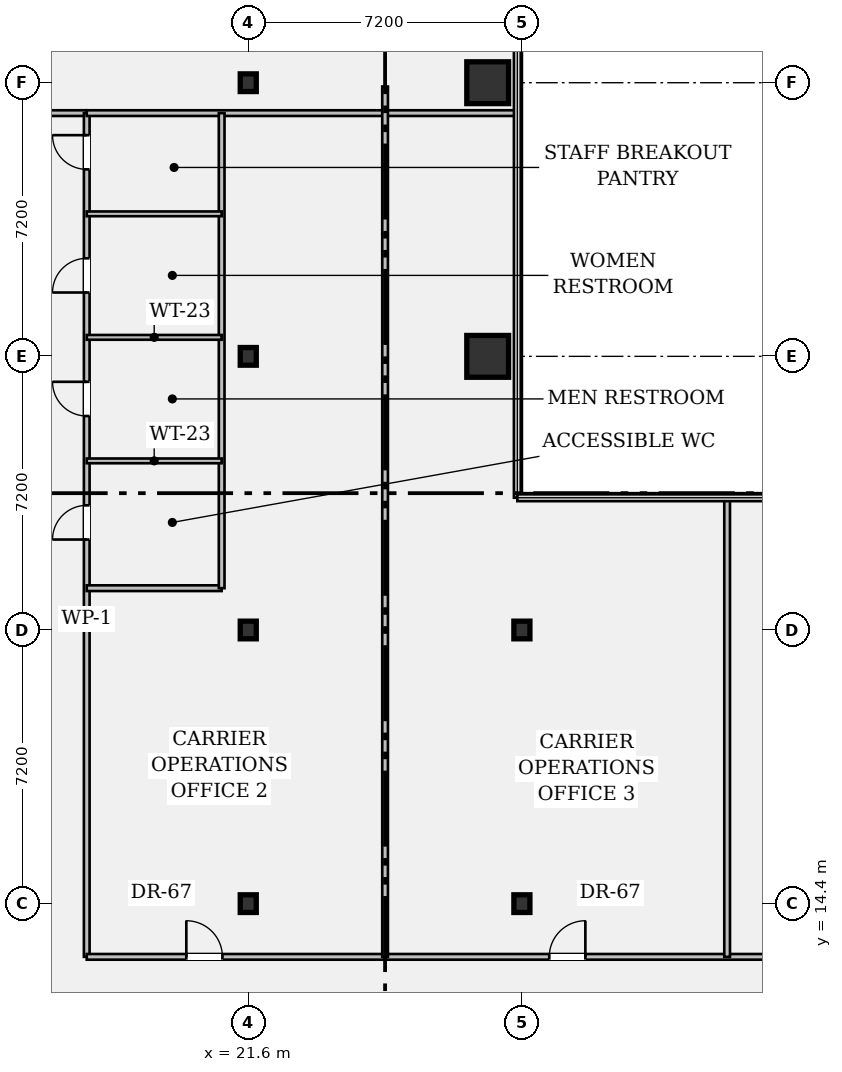
"""IFC4 building model, lengths in metres.
Left out: names, types, materials, properties, quantities, classifications, styles, units other than length and angle.
Written with IfcOpenShell. Run it as: python <this file> out.ifc"""

import sys

from ifc_helpers import new_model, si_unit, direction, frame, frame_2d, origin, origin_2d, place, context, subcontext, project, spatial, rectangle, hollow_rectangle, i_section, extrude, element, fill, save


model = new_model("IFC4")
c1 = context("Model", 3, precision=1e-05, world=origin(), true_north=direction((0.0, 1.0)))
c2 = subcontext(c1, "Body", "Model", "MODEL_VIEW")
j1 = project(units=[si_unit("LENGTHUNIT", "METRE"), si_unit("PLANEANGLEUNIT", "RADIAN")], contexts=[c1])
p1 = place(None, origin())
s1 = spatial("IfcSite", under=j1, at=p1, CompositionType="ELEMENT")
p2 = place(p1, origin())
s2 = spatial("IfcBuilding", under=s1, at=p2, CompositionType="ELEMENT")
p3 = place(p2, frame((0.0, 0.0, 31.15)))
s3 = spatial("IfcBuildingStorey", under=s2, at=p3, CompositionType="ELEMENT", Elevation=31.15)
for number, where, z_axis, x_axis in (
    (1, (21.6, 14.4, 0.0), (0.0, 0.0, 1.0), (1.0, 0.0, 0.0)),
    (2, (21.6, 21.6, 0.0), (0.0, 0.0, 1.0), (1.0, 0.0, 0.0)),
    (3, (21.6, 28.8, 0.0), (0.0, 0.0, 1.0), (1.0, 0.0, 0.0)),
    (4, (21.6, 36.0, 0.0), (0.0, 0.0, 1.0), (1.0, 0.0, 0.0)),
):
    element("IfcColumn", number, at=place(p3, frame(where, z_axis=z_axis, x_axis=x_axis)), inside=s3, PredefinedType="COLUMN", context=c2, shape_type="SweptSolid", body=[
        extrude(i_section(OverallWidth=0.422, OverallDepth=0.465, WebThickness=0.045, FlangeThickness=0.073, FilletRadius=0.018, at=origin_2d()), origin(), (0.0, 0.0, 1.0), 3.57),
    ])
for number, where, z_axis, x_axis in (
    (5, (27.9, 28.8, 0.0), (0.0, 0.0, 1.0), (1.0, 0.0, 0.0)),
    (6, (27.9, 36.0, 0.0), (0.0, 0.0, 1.0), (1.0, 0.0, 0.0)),
):
    element("IfcColumn", number, at=place(p3, frame(where, z_axis=z_axis, x_axis=x_axis)), inside=s3, PredefinedType="COLUMN", context=c2, shape_type="SweptSolid", body=[
        extrude(hollow_rectangle(XDim=1.1, YDim=1.1, WallThickness=0.07, at=origin_2d()), origin(), (0.0, 0.0, 1.0), 3.57),
    ])
for number, where, z_axis, x_axis in (
    (7, (28.8, 14.4, 0.0), (0.0, 0.0, 1.0), (1.0, 0.0, 0.0)),
    (8, (28.8, 21.6, 0.0), (0.0, 0.0, 1.0), (1.0, 0.0, 0.0)),
):
    element("IfcColumn", number, at=place(p3, frame(where, z_axis=z_axis, x_axis=x_axis)), inside=s3, PredefinedType="COLUMN", context=c2, shape_type="SweptSolid", body=[
        extrude(i_section(OverallWidth=0.422, OverallDepth=0.465, WebThickness=0.045, FlangeThickness=0.073, FilletRadius=0.018, at=origin_2d()), origin(), (0.0, 0.0, 1.0), 3.57),
    ])
p4 = place(p3, frame((14.4, 35.2, 0.0), z_axis=(0.0, 0.0, 1.0), x_axis=(1.0, 0.0, 0.0)))
e9 = element("IfcWall", 9, at=p4, inside=s3, PredefinedType="PARTITIONING", context=c2, shape_type="SweptSolid", body=[
    extrude(rectangle(XDim=2.95, YDim=0.15, at=frame_2d((1.475, 0.0))), origin(), (0.0, 0.0, 1.0), 2.628),
])
p5 = place(p4, frame((0.95, 0.0, 0.0)))
e10 = element("IfcOpeningElement", 10, at=p5, cuts=e9, PredefinedType="OPENING", context=c2, shape_type="SweptSolid", body=[
    extrude(rectangle(XDim=1.0, YDim=2.15, at=frame_2d((0.5, 1.075))), frame((0.0, 0.087, 0.0), z_axis=(0.0, -1.0, 0.0), x_axis=(1.0, 0.0, 0.0)), (0.0, 0.0, 1.0), 0.174),
])
p6 = place(p3, frame((17.35, 13.0, 0.0), z_axis=(0.0, 0.0, 1.0), x_axis=(0.0, 1.0, 0.0)))
e11 = element("IfcWall", 11, at=p6, inside=s3, PredefinedType="PARTITIONING", context=c2, shape_type="SweptSolid", body=[
    extrude(rectangle(XDim=22.2, YDim=0.15, at=frame_2d((11.1, 0.0))), origin(), (0.0, 0.0, 1.0), 2.628),
])
p7 = place(p6, frame((10.98, 0.0, 0.0)))
e12 = element("IfcOpeningElement", 12, at=p7, cuts=e11, PredefinedType="OPENING", context=c2, shape_type="SweptSolid", body=[
    extrude(rectangle(XDim=0.9, YDim=2.15, at=frame_2d((0.45, 1.075))), frame((0.0, 0.087, 0.0), z_axis=(0.0, -1.0, 0.0), x_axis=(1.0, 0.0, 0.0)), (0.0, 0.0, 1.0), 0.174),
])
p8 = place(p6, frame((14.23, 0.0, 0.0)))
e13 = element("IfcOpeningElement", 13, at=p8, cuts=e11, PredefinedType="OPENING", context=c2, shape_type="SweptSolid", body=[
    extrude(rectangle(XDim=0.9, YDim=2.15, at=frame_2d((0.45, 1.075))), frame((0.0, 0.087, 0.0), z_axis=(0.0, -1.0, 0.0), x_axis=(1.0, 0.0, 0.0)), (0.0, 0.0, 1.0), 0.174),
])
p9 = place(p6, frame((17.48, 0.0, 0.0)))
e14 = element("IfcOpeningElement", 14, at=p9, cuts=e11, PredefinedType="OPENING", context=c2, shape_type="SweptSolid", body=[
    extrude(rectangle(XDim=0.9, YDim=2.15, at=frame_2d((0.45, 1.075))), frame((0.0, 0.087, 0.0), z_axis=(0.0, -1.0, 0.0), x_axis=(1.0, 0.0, 0.0)), (0.0, 0.0, 1.0), 0.174),
])
p10 = place(p6, frame((20.72, 0.0, 0.0)))
e15 = element("IfcOpeningElement", 15, at=p10, cuts=e11, PredefinedType="OPENING", context=c2, shape_type="SweptSolid", body=[
    extrude(rectangle(XDim=0.9, YDim=2.15, at=frame_2d((0.45, 1.075))), frame((0.0, 0.087, 0.0), z_axis=(0.0, -1.0, 0.0), x_axis=(1.0, 0.0, 0.0)), (0.0, 0.0, 1.0), 0.174),
])
p11 = place(p3, frame((17.35, 13.0, 0.0), z_axis=(0.0, 0.0, 1.0), x_axis=(1.0, 0.0, 0.0)))
e16 = element("IfcWall", 16, at=p11, inside=s3, PredefinedType="PARTITIONING", context=c2, shape_type="SweptSolid", body=[
    extrude(rectangle(XDim=25.25, YDim=0.15, at=frame_2d((12.625, 0.0))), origin(), (0.0, 0.0, 1.0), 2.628),
])
p12 = place(p11, frame((2.62, 0.0, 0.0)))
e17 = element("IfcOpeningElement", 17, at=p12, cuts=e16, PredefinedType="OPENING", context=c2, shape_type="SweptSolid", body=[
    extrude(rectangle(XDim=0.95, YDim=2.15, at=frame_2d((0.475, 1.075))), frame((0.0, 0.087, 0.0), z_axis=(0.0, -1.0, 0.0), x_axis=(1.0, 0.0, 0.0)), (0.0, 0.0, 1.0), 0.174),
])
p13 = place(p11, frame((12.17, 0.0, 0.0)))
e18 = element("IfcOpeningElement", 18, at=p13, cuts=e16, PredefinedType="OPENING", context=c2, shape_type="SweptSolid", body=[
    extrude(rectangle(XDim=0.95, YDim=2.15, at=frame_2d((0.475, 1.075))), frame((0.0, 0.087, 0.0), z_axis=(0.0, -1.0, 0.0), x_axis=(1.0, 0.0, 0.0)), (0.0, 0.0, 1.0), 0.174),
])
p14 = place(p11, frame((20.55, 0.0, 0.0)))
e19 = element("IfcOpeningElement", 19, at=p14, cuts=e16, PredefinedType="OPENING", context=c2, shape_type="SweptSolid", body=[
    extrude(rectangle(XDim=0.95, YDim=2.15, at=frame_2d((0.475, 1.075))), frame((0.0, 0.087, 0.0), z_axis=(0.0, -1.0, 0.0), x_axis=(1.0, 0.0, 0.0)), (0.0, 0.0, 1.0), 0.174),
])
p15 = place(p3, frame((17.35, 35.2, 0.0), z_axis=(0.0, 0.0, 1.0), x_axis=(1.0, 0.0, 0.0)))
e20 = element("IfcWall", 20, at=p15, inside=s3, PredefinedType="PARTITIONING", context=c2, shape_type="SweptSolid", body=[
    extrude(rectangle(XDim=11.33, YDim=0.15, at=frame_2d((5.665, 0.0))), origin(), (0.0, 0.0, 1.0), 2.628),
])
p16 = place(p3, frame((17.35, 22.7, 0.0), z_axis=(0.0, 0.0, 1.0), x_axis=(1.0, 0.0, 0.0)))
e21 = element("IfcWall", 21, at=p16, inside=s3, PredefinedType="PARTITIONING", context=c2, shape_type="SweptSolid", body=[
    extrude(rectangle(XDim=3.55, YDim=0.15, at=frame_2d((1.775, 0.0))), origin(), (0.0, 0.0, 1.0), 3.088),
])
p17 = place(p3, frame((20.9, 22.7, 0.0), z_axis=(0.0, 0.0, 1.0), x_axis=(0.0, 1.0, 0.0)))
e22 = element("IfcWall", 22, at=p17, inside=s3, PredefinedType="PARTITIONING", context=c2, shape_type="SweptSolid", body=[
    extrude(rectangle(XDim=12.5, YDim=0.15, at=frame_2d((6.25, 0.0))), origin(), (0.0, 0.0, 1.0), 2.628),
])
for number, where, z_axis, x_axis in (
    (23, (17.35, 26.05, 0.0), (0.0, 0.0, 1.0), (1.0, 0.0, 0.0)),
    (24, (17.35, 29.3, 0.0), (0.0, 0.0, 1.0), (1.0, 0.0, 0.0)),
    (25, (17.35, 32.55, 0.0), (0.0, 0.0, 1.0), (1.0, 0.0, 0.0)),
):
    element("IfcWall", number, at=place(p3, frame(where, z_axis=z_axis, x_axis=x_axis)), inside=s3, PredefinedType="PARTITIONING", context=c2, shape_type="SweptSolid", body=[
        extrude(rectangle(XDim=3.55, YDim=0.125, at=frame_2d((1.775, 0.0))), origin(), (0.0, 0.0, 1.0), 3.088),
    ])
p18 = place(p3, frame((25.2, 13.0, 0.0), z_axis=(0.0, 0.0, 1.0), x_axis=(0.0, 1.0, 0.0)))
e26 = element("IfcWall", 26, at=p18, inside=s3, PredefinedType="PARTITIONING", context=c2, shape_type="SweptSolid", body=[
    extrude(rectangle(XDim=22.9, YDim=0.15, at=frame_2d((11.45, 0.0))), origin(), (0.0, 0.0, 1.0), 2.628),
])
p19 = place(p3, frame((34.2, 13.0, 0.0), z_axis=(0.0, 0.0, 1.0), x_axis=(0.0, 1.0, 0.0)))
e27 = element("IfcWall", 27, at=p19, inside=s3, PredefinedType="PARTITIONING", context=c2, shape_type="SweptSolid", body=[
    extrude(rectangle(XDim=12.05, YDim=0.15, at=frame_2d((6.025, 0.0))), origin(), (0.0, 0.0, 1.0), 2.628),
])
p20 = place(p7, origin())
e28 = element("IfcDoor", 28, at=p20, inside=s3, OperationType="SINGLE_SWING_LEFT", PredefinedType="DOOR", context=c2, shape_type="SweptSolid", body=[
    extrude(rectangle(XDim=0.9, YDim=2.15, at=frame_2d((0.45, 1.075))), frame((0.0, 0.025, 0.0), z_axis=(0.0, -1.0, 0.0), x_axis=(1.0, 0.0, 0.0)), (0.0, 0.0, 1.0), 0.05),
])
fill(e12, e28)
p21 = place(p8, origin())
e29 = element("IfcDoor", 29, at=p21, inside=s3, OperationType="SINGLE_SWING_RIGHT", PredefinedType="DOOR", context=c2, shape_type="SweptSolid", body=[
    extrude(rectangle(XDim=0.9, YDim=2.15, at=frame_2d((0.45, 1.075))), frame((0.0, 0.025, 0.0), z_axis=(0.0, -1.0, 0.0), x_axis=(1.0, 0.0, 0.0)), (0.0, 0.0, 1.0), 0.05),
])
fill(e13, e29)
p22 = place(p9, origin())
e30 = element("IfcDoor", 30, at=p22, inside=s3, OperationType="SINGLE_SWING_LEFT", PredefinedType="DOOR", context=c2, shape_type="SweptSolid", body=[
    extrude(rectangle(XDim=0.9, YDim=2.15, at=frame_2d((0.45, 1.075))), frame((0.0, 0.025, 0.0), z_axis=(0.0, -1.0, 0.0), x_axis=(1.0, 0.0, 0.0)), (0.0, 0.0, 1.0), 0.05),
])
fill(e14, e30)
p23 = place(p10, origin())
e31 = element("IfcDoor", 31, at=p23, inside=s3, OperationType="SINGLE_SWING_RIGHT", PredefinedType="DOOR", context=c2, shape_type="SweptSolid", body=[
    extrude(rectangle(XDim=0.9, YDim=2.15, at=frame_2d((0.45, 1.075))), frame((0.0, 0.025, 0.0), z_axis=(0.0, -1.0, 0.0), x_axis=(1.0, 0.0, 0.0)), (0.0, 0.0, 1.0), 0.05),
])
fill(e15, e31)
p24 = place(p12, origin())
e32 = element("IfcDoor", 32, at=p24, inside=s3, OperationType="SINGLE_SWING_LEFT", PredefinedType="DOOR", context=c2, shape_type="SweptSolid", body=[
    extrude(rectangle(XDim=0.95, YDim=2.15, at=frame_2d((0.475, 1.075))), frame((0.0, 0.025, 0.0), z_axis=(0.0, -1.0, 0.0), x_axis=(1.0, 0.0, 0.0)), (0.0, 0.0, 1.0), 0.05),
])
fill(e17, e32)
p25 = place(p13, origin())
e33 = element("IfcDoor", 33, at=p25, inside=s3, OperationType="SINGLE_SWING_RIGHT", PredefinedType="DOOR", context=c2, shape_type="SweptSolid", body=[
    extrude(rectangle(XDim=0.95, YDim=2.15, at=frame_2d((0.475, 1.075))), frame((0.0, 0.025, 0.0), z_axis=(0.0, -1.0, 0.0), x_axis=(1.0, 0.0, 0.0)), (0.0, 0.0, 1.0), 0.05),
])
fill(e18, e33)
save(model, sys.argv[1])
